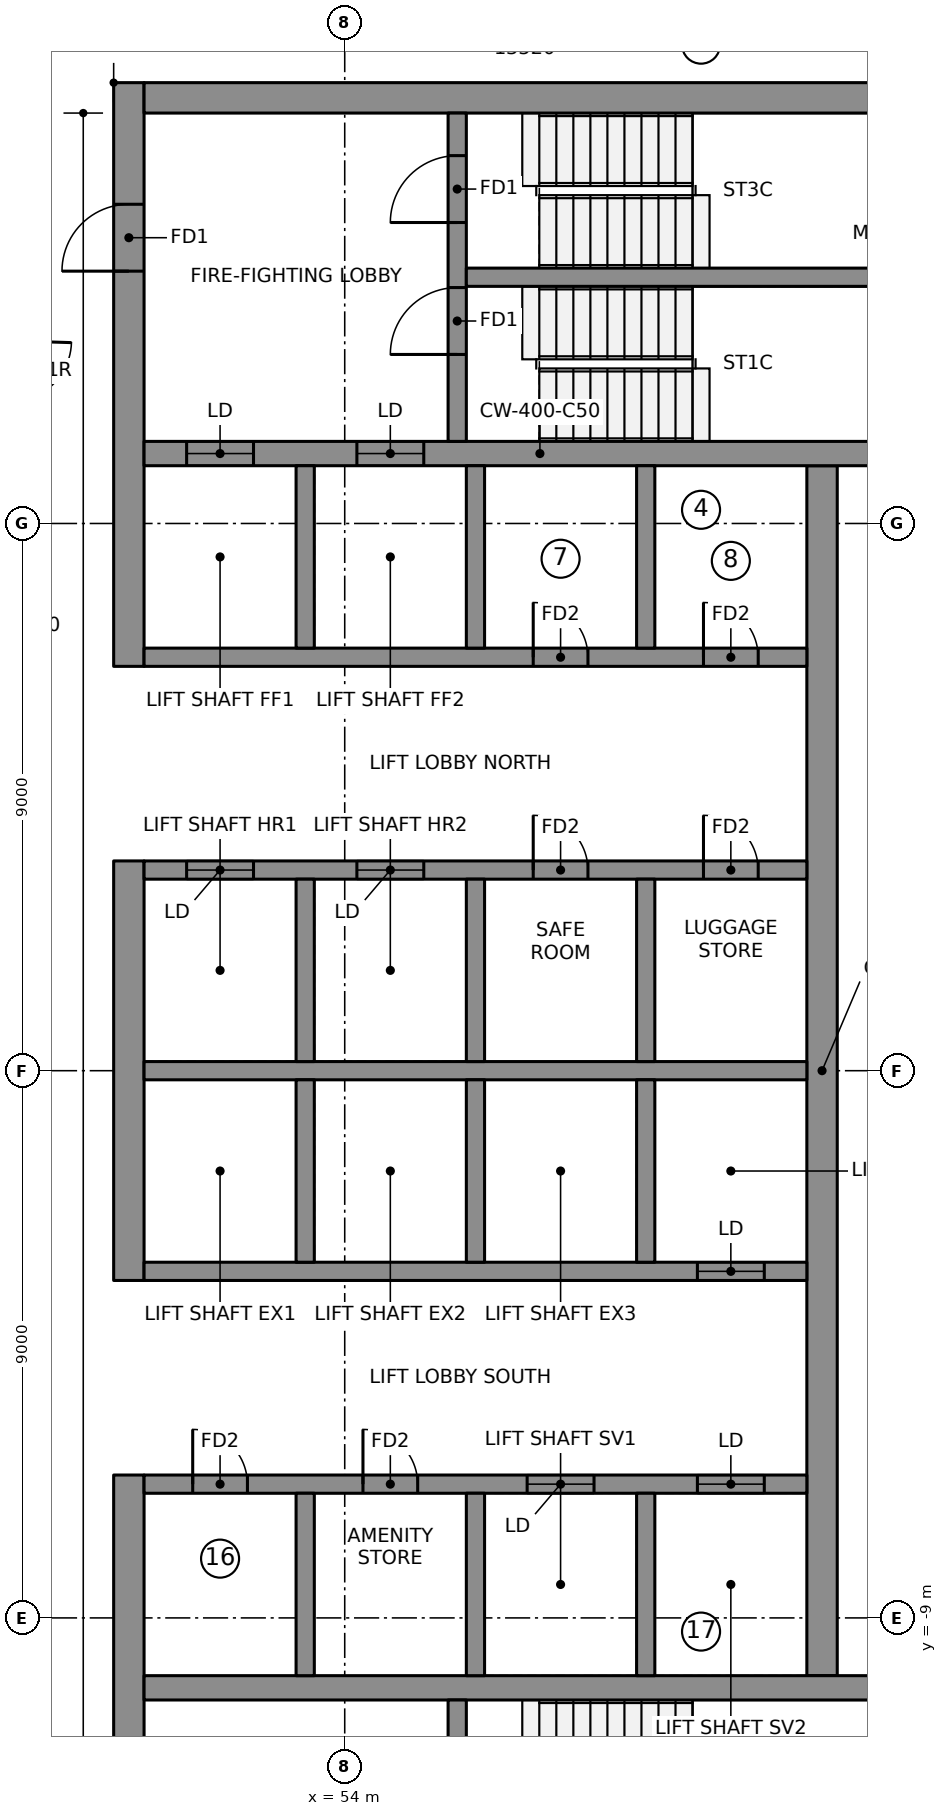
"""IFC4 building model, lengths in metres.
Left out: names, types, materials, properties, quantities, classifications, styles, units other than length and angle.
Written with IfcOpenShell. Run it as: python <this file> out.ifc"""

import sys

from ifc_helpers import new_model, si_unit, direction, frame, frame_2d, origin, place, context, subcontext, project, spatial, rectangle, extrude, element, fill, save


model = new_model("IFC4")
c1 = context("Model", 3, precision=1e-05, world=origin(), true_north=direction((0.0, 1.0)))
c2 = subcontext(c1, "Body", "Model", "MODEL_VIEW")
j1 = project(units=[si_unit("LENGTHUNIT", "METRE"), si_unit("PLANEANGLEUNIT", "RADIAN")], contexts=[c1])
p1 = place(None, origin())
s1 = spatial("IfcSite", under=j1, at=p1, CompositionType="ELEMENT")
p2 = place(p1, origin())
s2 = spatial("IfcBuilding", under=s1, at=p2, CompositionType="ELEMENT")
p3 = place(p2, frame((0.0, 0.0, 289.2)))
s3 = spatial("IfcBuildingStorey", under=s2, at=p3, CompositionType="ELEMENT", Elevation=289.2)
p4 = place(p3, frame((50.45, 6.65, 0.0), z_axis=(0.0, 0.0, 1.0), x_axis=(0.0, 1.0, 0.0)))
e1 = element("IfcWall", 1, at=p4, inside=s3, PredefinedType="SHEAR", context=c2, shape_type="SweptSolid", body=[
    extrude(rectangle(XDim=9.6, YDim=0.5, at=frame_2d((4.8, 0.0))), origin(), (0.0, 0.0, 1.0), 3.55),
])
p5 = place(p4, frame((6.5, 0.0, 0.0)))
e2 = element("IfcOpeningElement", 2, at=p5, cuts=e1, PredefinedType="OPENING", context=c2, shape_type="SweptSolid", body=[
    extrude(rectangle(XDim=1.1, YDim=2.1, at=frame_2d((0.55, 1.05))), frame((0.0, 0.26, 0.0), z_axis=(0.0, -1.0, 0.0), x_axis=(1.0, 0.0, 0.0)), (0.0, 0.0, 1.0), 0.52),
])
p6 = place(p3, frame((50.45, -3.45, 0.0), z_axis=(0.0, 0.0, 1.0), x_axis=(0.0, 1.0, 0.0)))
e3 = element("IfcWall", 3, at=p6, inside=s3, PredefinedType="SHEAR", context=c2, shape_type="SweptSolid", body=[
    extrude(rectangle(XDim=6.9, YDim=0.5, at=frame_2d((3.45, 0.0))), origin(), (0.0, 0.0, 1.0), 3.55),
])
p7 = place(p3, frame((50.45, -16.25, 0.0), z_axis=(0.0, 0.0, 1.0), x_axis=(0.0, 1.0, 0.0)))
e4 = element("IfcWall", 4, at=p7, inside=s3, PredefinedType="SHEAR", context=c2, shape_type="SweptSolid", body=[
    extrude(rectangle(XDim=9.6, YDim=0.5, at=frame_2d((4.8, 0.0))), origin(), (0.0, 0.0, 1.0), 3.55),
])
p8 = place(p7, frame((2.0, 0.0, 0.0)))
e5 = element("IfcOpeningElement", 5, at=p8, cuts=e4, PredefinedType="OPENING", context=c2, shape_type="SweptSolid", body=[
    extrude(rectangle(XDim=1.1, YDim=2.1, at=frame_2d((0.55, 1.05))), frame((0.0, 0.26, 0.0), z_axis=(0.0, -1.0, 0.0), x_axis=(1.0, 0.0, 0.0)), (0.0, 0.0, 1.0), 0.52),
])
p9 = place(p3, frame((50.7, 16.0, 0.0), z_axis=(0.0, 0.0, 1.0), x_axis=(1.0, 0.0, 0.0)))
e6 = element("IfcWall", 6, at=p9, inside=s3, PredefinedType="SHEAR", context=c2, shape_type="SweptSolid", body=[
    extrude(rectangle(XDim=13.52, YDim=0.5, at=frame_2d((6.76, 0.0))), origin(), (0.0, 0.0, 1.0), 3.55),
])
p10 = place(p3, frame((61.85, -9.95, 0.0), z_axis=(0.0, 0.0, 1.0), x_axis=(0.0, 1.0, 0.0)))
e7 = element("IfcWall", 7, at=p10, inside=s3, PredefinedType="SHEAR", context=c2, shape_type="SweptSolid", body=[
    extrude(rectangle(XDim=19.9, YDim=0.5, at=frame_2d((9.95, 0.0))), origin(), (0.0, 0.0, 1.0), 3.55),
])
p11 = place(p3, frame((50.7, 10.15, 0.0), z_axis=(0.0, 0.0, 1.0), x_axis=(1.0, 0.0, 0.0)))
e8 = element("IfcWall", 8, at=p11, inside=s3, PredefinedType="SHEAR", context=c2, shape_type="SweptSolid", body=[
    extrude(rectangle(XDim=13.02, YDim=0.4, at=frame_2d((6.51, 0.0))), origin(), (0.0, 0.0, 1.0), 3.55),
])
p12 = place(p11, frame((0.7, 0.0, 0.0)))
e9 = element("IfcOpeningElement", 9, at=p12, cuts=e8, PredefinedType="OPENING", context=c2, shape_type="SweptSolid", body=[
    extrude(rectangle(XDim=1.1, YDim=2.1, at=frame_2d((0.55, 1.05))), frame((0.0, 0.21, 0.0), z_axis=(0.0, -1.0, 0.0), x_axis=(1.0, 0.0, 0.0)), (0.0, 0.0, 1.0), 0.42),
])
p13 = place(p11, frame((3.5, 0.0, 0.0)))
e10 = element("IfcOpeningElement", 10, at=p13, cuts=e8, PredefinedType="OPENING", context=c2, shape_type="SweptSolid", body=[
    extrude(rectangle(XDim=1.1, YDim=2.1, at=frame_2d((0.55, 1.05))), frame((0.0, 0.21, 0.0), z_axis=(0.0, -1.0, 0.0), x_axis=(1.0, 0.0, 0.0)), (0.0, 0.0, 1.0), 0.42),
])
p14 = place(p3, frame((50.7, -10.15, 0.0), z_axis=(0.0, 0.0, 1.0), x_axis=(1.0, 0.0, 0.0)))
e11 = element("IfcWall", 11, at=p14, inside=s3, PredefinedType="SHEAR", context=c2, shape_type="SweptSolid", body=[
    extrude(rectangle(XDim=13.02, YDim=0.4, at=frame_2d((6.51, 0.0))), origin(), (0.0, 0.0, 1.0), 3.55),
])
p15 = place(p3, frame((50.7, 0.0, 0.0), z_axis=(0.0, 0.0, 1.0), x_axis=(1.0, 0.0, 0.0)))
e12 = element("IfcWall", 12, at=p15, inside=s3, PredefinedType="SHEAR", context=c2, shape_type="SweptSolid", body=[
    extrude(rectangle(XDim=10.9, YDim=0.3, at=frame_2d((5.45, 0.0))), origin(), (0.0, 0.0, 1.0), 3.55),
])
p16 = place(p3, frame((50.7, 3.3, 0.0), z_axis=(0.0, 0.0, 1.0), x_axis=(1.0, 0.0, 0.0)))
e13 = element("IfcWall", 13, at=p16, inside=s3, PredefinedType="SHEAR", context=c2, shape_type="SweptSolid", body=[
    extrude(rectangle(XDim=10.9, YDim=0.3, at=frame_2d((5.45, 0.0))), origin(), (0.0, 0.0, 1.0), 3.55),
])
p17 = place(p16, frame((0.7, 0.0, 0.0)))
e14 = element("IfcOpeningElement", 14, at=p17, cuts=e13, PredefinedType="OPENING", context=c2, shape_type="SweptSolid", body=[
    extrude(rectangle(XDim=1.1, YDim=2.1, at=frame_2d((0.55, 1.05))), frame((0.0, 0.16, 0.0), z_axis=(0.0, -1.0, 0.0), x_axis=(1.0, 0.0, 0.0)), (0.0, 0.0, 1.0), 0.32),
])
p18 = place(p16, frame((3.5, 0.0, 0.0)))
e15 = element("IfcOpeningElement", 15, at=p18, cuts=e13, PredefinedType="OPENING", context=c2, shape_type="SweptSolid", body=[
    extrude(rectangle(XDim=1.1, YDim=2.1, at=frame_2d((0.55, 1.05))), frame((0.0, 0.16, 0.0), z_axis=(0.0, -1.0, 0.0), x_axis=(1.0, 0.0, 0.0)), (0.0, 0.0, 1.0), 0.32),
])
p19 = place(p16, frame((6.4, 0.0, 0.0)))
e16 = element("IfcOpeningElement", 16, at=p19, cuts=e13, PredefinedType="OPENING", context=c2, shape_type="SweptSolid", body=[
    extrude(rectangle(XDim=0.9, YDim=2.1, at=frame_2d((0.45, 1.05))), frame((0.0, 0.16, 0.0), z_axis=(0.0, -1.0, 0.0), x_axis=(1.0, 0.0, 0.0)), (0.0, 0.0, 1.0), 0.32),
])
p20 = place(p16, frame((9.2, 0.0, 0.0)))
e17 = element("IfcOpeningElement", 17, at=p20, cuts=e13, PredefinedType="OPENING", context=c2, shape_type="SweptSolid", body=[
    extrude(rectangle(XDim=0.9, YDim=2.1, at=frame_2d((0.45, 1.05))), frame((0.0, 0.16, 0.0), z_axis=(0.0, -1.0, 0.0), x_axis=(1.0, 0.0, 0.0)), (0.0, 0.0, 1.0), 0.32),
])
p21 = place(p3, frame((50.7, 6.8, 0.0), z_axis=(0.0, 0.0, 1.0), x_axis=(1.0, 0.0, 0.0)))
e18 = element("IfcWall", 18, at=p21, inside=s3, PredefinedType="SHEAR", context=c2, shape_type="SweptSolid", body=[
    extrude(rectangle(XDim=10.9, YDim=0.3, at=frame_2d((5.45, 0.0))), origin(), (0.0, 0.0, 1.0), 3.55),
])
p22 = place(p21, frame((6.4, 0.0, 0.0)))
e19 = element("IfcOpeningElement", 19, at=p22, cuts=e18, PredefinedType="OPENING", context=c2, shape_type="SweptSolid", body=[
    extrude(rectangle(XDim=0.9, YDim=2.1, at=frame_2d((0.45, 1.05))), frame((0.0, 0.16, 0.0), z_axis=(0.0, -1.0, 0.0), x_axis=(1.0, 0.0, 0.0)), (0.0, 0.0, 1.0), 0.32),
])
p23 = place(p21, frame((9.2, 0.0, 0.0)))
e20 = element("IfcOpeningElement", 20, at=p23, cuts=e18, PredefinedType="OPENING", context=c2, shape_type="SweptSolid", body=[
    extrude(rectangle(XDim=0.9, YDim=2.1, at=frame_2d((0.45, 1.05))), frame((0.0, 0.16, 0.0), z_axis=(0.0, -1.0, 0.0), x_axis=(1.0, 0.0, 0.0)), (0.0, 0.0, 1.0), 0.32),
])
for number, where, z_axis, x_axis in (
    (21, (53.35, 0.15, 0.0), (0.0, 0.0, 1.0), (0.0, 1.0, 0.0)),
    (22, (53.35, 6.95, 0.0), (0.0, 0.0, 1.0), (0.0, 1.0, 0.0)),
    (23, (56.15, 0.15, 0.0), (0.0, 0.0, 1.0), (0.0, 1.0, 0.0)),
    (24, (56.15, 6.95, 0.0), (0.0, 0.0, 1.0), (0.0, 1.0, 0.0)),
    (25, (58.95, 0.15, 0.0), (0.0, 0.0, 1.0), (0.0, 1.0, 0.0)),
    (26, (58.95, 6.95, 0.0), (0.0, 0.0, 1.0), (0.0, 1.0, 0.0)),
):
    element("IfcWall", number, at=place(p3, frame(where, z_axis=z_axis, x_axis=x_axis)), inside=s3, PredefinedType="SHEAR", context=c2, shape_type="SweptSolid", body=[
        extrude(rectangle(XDim=3.0, YDim=0.3, at=frame_2d((1.5, 0.0))), origin(), (0.0, 0.0, 1.0), 3.55),
    ])
p24 = place(p3, frame((50.7, -3.3, 0.0), z_axis=(0.0, 0.0, 1.0), x_axis=(1.0, 0.0, 0.0)))
e27 = element("IfcWall", 27, at=p24, inside=s3, PredefinedType="SHEAR", context=c2, shape_type="SweptSolid", body=[
    extrude(rectangle(XDim=10.9, YDim=0.3, at=frame_2d((5.45, 0.0))), origin(), (0.0, 0.0, 1.0), 3.55),
])
p25 = place(p24, frame((9.1, 0.0, 0.0)))
e28 = element("IfcOpeningElement", 28, at=p25, cuts=e27, PredefinedType="OPENING", context=c2, shape_type="SweptSolid", body=[
    extrude(rectangle(XDim=1.1, YDim=2.1, at=frame_2d((0.55, 1.05))), frame((0.0, 0.16, 0.0), z_axis=(0.0, -1.0, 0.0), x_axis=(1.0, 0.0, 0.0)), (0.0, 0.0, 1.0), 0.32),
])
p26 = place(p3, frame((50.7, -6.8, 0.0), z_axis=(0.0, 0.0, 1.0), x_axis=(1.0, 0.0, 0.0)))
e29 = element("IfcWall", 29, at=p26, inside=s3, PredefinedType="SHEAR", context=c2, shape_type="SweptSolid", body=[
    extrude(rectangle(XDim=10.9, YDim=0.3, at=frame_2d((5.45, 0.0))), origin(), (0.0, 0.0, 1.0), 3.55),
])
p27 = place(p26, frame((6.3, 0.0, 0.0)))
e30 = element("IfcOpeningElement", 30, at=p27, cuts=e29, PredefinedType="OPENING", context=c2, shape_type="SweptSolid", body=[
    extrude(rectangle(XDim=1.1, YDim=2.1, at=frame_2d((0.55, 1.05))), frame((0.0, 0.16, 0.0), z_axis=(0.0, -1.0, 0.0), x_axis=(1.0, 0.0, 0.0)), (0.0, 0.0, 1.0), 0.32),
])
p28 = place(p26, frame((9.1, 0.0, 0.0)))
e31 = element("IfcOpeningElement", 31, at=p28, cuts=e29, PredefinedType="OPENING", context=c2, shape_type="SweptSolid", body=[
    extrude(rectangle(XDim=1.1, YDim=2.1, at=frame_2d((0.55, 1.05))), frame((0.0, 0.16, 0.0), z_axis=(0.0, -1.0, 0.0), x_axis=(1.0, 0.0, 0.0)), (0.0, 0.0, 1.0), 0.32),
])
p29 = place(p26, frame((0.8, 0.0, 0.0)))
e32 = element("IfcOpeningElement", 32, at=p29, cuts=e29, PredefinedType="OPENING", context=c2, shape_type="SweptSolid", body=[
    extrude(rectangle(XDim=0.9, YDim=2.1, at=frame_2d((0.45, 1.05))), frame((0.0, 0.16, 0.0), z_axis=(0.0, -1.0, 0.0), x_axis=(1.0, 0.0, 0.0)), (0.0, 0.0, 1.0), 0.32),
])
p30 = place(p26, frame((3.6, 0.0, 0.0)))
e33 = element("IfcOpeningElement", 33, at=p30, cuts=e29, PredefinedType="OPENING", context=c2, shape_type="SweptSolid", body=[
    extrude(rectangle(XDim=0.9, YDim=2.1, at=frame_2d((0.45, 1.05))), frame((0.0, 0.16, 0.0), z_axis=(0.0, -1.0, 0.0), x_axis=(1.0, 0.0, 0.0)), (0.0, 0.0, 1.0), 0.32),
])
for number, where, z_axis, x_axis in (
    (34, (53.35, -3.15, 0.0), (0.0, 0.0, 1.0), (0.0, 1.0, 0.0)),
    (35, (53.35, -9.95, 0.0), (0.0, 0.0, 1.0), (0.0, 1.0, 0.0)),
    (36, (56.15, -3.15, 0.0), (0.0, 0.0, 1.0), (0.0, 1.0, 0.0)),
    (37, (56.15, -9.95, 0.0), (0.0, 0.0, 1.0), (0.0, 1.0, 0.0)),
    (38, (58.95, -3.15, 0.0), (0.0, 0.0, 1.0), (0.0, 1.0, 0.0)),
    (39, (58.95, -9.95, 0.0), (0.0, 0.0, 1.0), (0.0, 1.0, 0.0)),
):
    element("IfcWall", number, at=place(p3, frame(where, z_axis=z_axis, x_axis=x_axis)), inside=s3, PredefinedType="SHEAR", context=c2, shape_type="SweptSolid", body=[
        extrude(rectangle(XDim=3.0, YDim=0.3, at=frame_2d((1.5, 0.0))), origin(), (0.0, 0.0, 1.0), 3.55),
    ])
p31 = place(p3, frame((55.85, 10.35, 0.0), z_axis=(0.0, 0.0, 1.0), x_axis=(0.0, 1.0, 0.0)))
e40 = element("IfcWall", 40, at=p31, inside=s3, PredefinedType="SHEAR", context=c2, shape_type="SweptSolid", body=[
    extrude(rectangle(XDim=5.4, YDim=0.3, at=frame_2d((2.7, 0.0))), origin(), (0.0, 0.0, 1.0), 3.55),
])
p32 = place(p31, frame((1.43, 0.0, 0.0)))
e41 = element("IfcOpeningElement", 41, at=p32, cuts=e40, PredefinedType="OPENING", context=c2, shape_type="SweptSolid", body=[
    extrude(rectangle(XDim=1.1, YDim=2.1, at=frame_2d((0.55, 1.05))), frame((0.0, 0.16, 0.0), z_axis=(0.0, -1.0, 0.0), x_axis=(1.0, 0.0, 0.0)), (0.0, 0.0, 1.0), 0.32),
])
p33 = place(p31, frame((3.6, 0.0, 0.0)))
e42 = element("IfcOpeningElement", 42, at=p33, cuts=e40, PredefinedType="OPENING", context=c2, shape_type="SweptSolid", body=[
    extrude(rectangle(XDim=1.1, YDim=2.1, at=frame_2d((0.55, 1.05))), frame((0.0, 0.16, 0.0), z_axis=(0.0, -1.0, 0.0), x_axis=(1.0, 0.0, 0.0)), (0.0, 0.0, 1.0), 0.32),
])
p34 = place(p3, frame((55.85, -15.75, 0.0), z_axis=(0.0, 0.0, 1.0), x_axis=(0.0, 1.0, 0.0)))
e43 = element("IfcWall", 43, at=p34, inside=s3, PredefinedType="SHEAR", context=c2, shape_type="SweptSolid", body=[
    extrude(rectangle(XDim=5.4, YDim=0.3, at=frame_2d((2.7, 0.0))), origin(), (0.0, 0.0, 1.0), 3.55),
])
p35 = place(p34, frame((3.6, 0.0, 0.0)))
e44 = element("IfcOpeningElement", 44, at=p35, cuts=e43, PredefinedType="OPENING", context=c2, shape_type="SweptSolid", body=[
    extrude(rectangle(XDim=1.1, YDim=2.1, at=frame_2d((0.55, 1.05))), frame((0.0, 0.16, 0.0), z_axis=(0.0, -1.0, 0.0), x_axis=(1.0, 0.0, 0.0)), (0.0, 0.0, 1.0), 0.32),
])
p36 = place(p34, frame((0.8, 0.0, 0.0)))
e45 = element("IfcOpeningElement", 45, at=p36, cuts=e43, PredefinedType="OPENING", context=c2, shape_type="SweptSolid", body=[
    extrude(rectangle(XDim=0.9, YDim=2.1, at=frame_2d((0.45, 1.05))), frame((0.0, 0.16, 0.0), z_axis=(0.0, -1.0, 0.0), x_axis=(1.0, 0.0, 0.0)), (0.0, 0.0, 1.0), 0.32),
])
p37 = place(p3, frame((56.0, 13.05, 0.0), z_axis=(0.0, 0.0, 1.0), x_axis=(1.0, 0.0, 0.0)))
e46 = element("IfcWall", 46, at=p37, inside=s3, PredefinedType="SHEAR", context=c2, shape_type="SweptSolid", body=[
    extrude(rectangle(XDim=7.72, YDim=0.3, at=frame_2d((3.86, 0.0))), origin(), (0.0, 0.0, 1.0), 3.55),
])
p38 = place(p12, origin())
e47 = element("IfcDoor", 47, at=p38, inside=s3, OperationType="DOUBLE_DOOR_SLIDING", PredefinedType="DOOR", context=c2, shape_type="SweptSolid", body=[
    extrude(rectangle(XDim=1.1, YDim=2.1, at=frame_2d((0.55, 1.05))), frame((0.0, 0.025, 0.0), z_axis=(0.0, -1.0, 0.0), x_axis=(1.0, 0.0, 0.0)), (0.0, 0.0, 1.0), 0.05),
])
fill(e9, e47)
p39 = place(p13, origin())
e48 = element("IfcDoor", 48, at=p39, inside=s3, OperationType="DOUBLE_DOOR_SLIDING", PredefinedType="DOOR", context=c2, shape_type="SweptSolid", body=[
    extrude(rectangle(XDim=1.1, YDim=2.1, at=frame_2d((0.55, 1.05))), frame((0.0, 0.025, 0.0), z_axis=(0.0, -1.0, 0.0), x_axis=(1.0, 0.0, 0.0)), (0.0, 0.0, 1.0), 0.05),
])
fill(e10, e48)
p40 = place(p17, origin())
e49 = element("IfcDoor", 49, at=p40, inside=s3, OperationType="DOUBLE_DOOR_SLIDING", PredefinedType="DOOR", context=c2, shape_type="SweptSolid", body=[
    extrude(rectangle(XDim=1.1, YDim=2.1, at=frame_2d((0.55, 1.05))), frame((0.0, 0.025, 0.0), z_axis=(0.0, -1.0, 0.0), x_axis=(1.0, 0.0, 0.0)), (0.0, 0.0, 1.0), 0.05),
])
fill(e14, e49)
p41 = place(p18, origin())
e50 = element("IfcDoor", 50, at=p41, inside=s3, OperationType="DOUBLE_DOOR_SLIDING", PredefinedType="DOOR", context=c2, shape_type="SweptSolid", body=[
    extrude(rectangle(XDim=1.1, YDim=2.1, at=frame_2d((0.55, 1.05))), frame((0.0, 0.025, 0.0), z_axis=(0.0, -1.0, 0.0), x_axis=(1.0, 0.0, 0.0)), (0.0, 0.0, 1.0), 0.05),
])
fill(e15, e50)
p42 = place(p25, origin())
e51 = element("IfcDoor", 51, at=p42, inside=s3, OperationType="DOUBLE_DOOR_SLIDING", PredefinedType="DOOR", context=c2, shape_type="SweptSolid", body=[
    extrude(rectangle(XDim=1.1, YDim=2.1, at=frame_2d((0.55, 1.05))), frame((0.0, 0.025, 0.0), z_axis=(0.0, -1.0, 0.0), x_axis=(1.0, 0.0, 0.0)), (0.0, 0.0, 1.0), 0.05),
])
fill(e28, e51)
p43 = place(p27, origin())
e52 = element("IfcDoor", 52, at=p43, inside=s3, OperationType="DOUBLE_DOOR_SLIDING", PredefinedType="DOOR", context=c2, shape_type="SweptSolid", body=[
    extrude(rectangle(XDim=1.1, YDim=2.1, at=frame_2d((0.55, 1.05))), frame((0.0, 0.025, 0.0), z_axis=(0.0, -1.0, 0.0), x_axis=(1.0, 0.0, 0.0)), (0.0, 0.0, 1.0), 0.05),
])
fill(e30, e52)
p44 = place(p28, origin())
e53 = element("IfcDoor", 53, at=p44, inside=s3, OperationType="DOUBLE_DOOR_SLIDING", PredefinedType="DOOR", context=c2, shape_type="SweptSolid", body=[
    extrude(rectangle(XDim=1.1, YDim=2.1, at=frame_2d((0.55, 1.05))), frame((0.0, 0.025, 0.0), z_axis=(0.0, -1.0, 0.0), x_axis=(1.0, 0.0, 0.0)), (0.0, 0.0, 1.0), 0.05),
])
fill(e31, e53)
p45 = place(p32, origin())
e54 = element("IfcDoor", 54, at=p45, inside=s3, OperationType="SINGLE_SWING_RIGHT", PredefinedType="DOOR", context=c2, shape_type="SweptSolid", body=[
    extrude(rectangle(XDim=1.1, YDim=2.1, at=frame_2d((0.55, 1.05))), frame((0.0, 0.025, 0.0), z_axis=(0.0, -1.0, 0.0), x_axis=(1.0, 0.0, 0.0)), (0.0, 0.0, 1.0), 0.05),
])
fill(e41, e54)
p46 = place(p33, origin())
e55 = element("IfcDoor", 55, at=p46, inside=s3, OperationType="SINGLE_SWING_RIGHT", PredefinedType="DOOR", context=c2, shape_type="SweptSolid", body=[
    extrude(rectangle(XDim=1.1, YDim=2.1, at=frame_2d((0.55, 1.05))), frame((0.0, 0.025, 0.0), z_axis=(0.0, -1.0, 0.0), x_axis=(1.0, 0.0, 0.0)), (0.0, 0.0, 1.0), 0.05),
])
fill(e42, e55)
p47 = place(p5, origin())
e56 = element("IfcDoor", 56, at=p47, inside=s3, OperationType="SINGLE_SWING_RIGHT", PredefinedType="DOOR", context=c2, shape_type="SweptSolid", body=[
    extrude(rectangle(XDim=1.1, YDim=2.1, at=frame_2d((0.55, 1.05))), frame((0.0, 0.025, 0.0), z_axis=(0.0, -1.0, 0.0), x_axis=(1.0, 0.0, 0.0)), (0.0, 0.0, 1.0), 0.05),
])
fill(e2, e56)
p48 = place(p22, origin())
e57 = element("IfcDoor", 57, at=p48, inside=s3, OperationType="SINGLE_SWING_LEFT", PredefinedType="DOOR", context=c2, shape_type="SweptSolid", body=[
    extrude(rectangle(XDim=0.9, YDim=2.1, at=frame_2d((0.45, 1.05))), frame((0.0, 0.025, 0.0), z_axis=(0.0, -1.0, 0.0), x_axis=(1.0, 0.0, 0.0)), (0.0, 0.0, 1.0), 0.05),
])
fill(e19, e57)
p49 = place(p23, origin())
e58 = element("IfcDoor", 58, at=p49, inside=s3, OperationType="SINGLE_SWING_LEFT", PredefinedType="DOOR", context=c2, shape_type="SweptSolid", body=[
    extrude(rectangle(XDim=0.9, YDim=2.1, at=frame_2d((0.45, 1.05))), frame((0.0, 0.025, 0.0), z_axis=(0.0, -1.0, 0.0), x_axis=(1.0, 0.0, 0.0)), (0.0, 0.0, 1.0), 0.05),
])
fill(e20, e58)
p50 = place(p19, origin())
e59 = element("IfcDoor", 59, at=p50, inside=s3, OperationType="SINGLE_SWING_LEFT", PredefinedType="DOOR", context=c2, shape_type="SweptSolid", body=[
    extrude(rectangle(XDim=0.9, YDim=2.1, at=frame_2d((0.45, 1.05))), frame((0.0, 0.025, 0.0), z_axis=(0.0, -1.0, 0.0), x_axis=(1.0, 0.0, 0.0)), (0.0, 0.0, 1.0), 0.05),
])
fill(e16, e59)
p51 = place(p20, origin())
e60 = element("IfcDoor", 60, at=p51, inside=s3, OperationType="SINGLE_SWING_LEFT", PredefinedType="DOOR", context=c2, shape_type="SweptSolid", body=[
    extrude(rectangle(XDim=0.9, YDim=2.1, at=frame_2d((0.45, 1.05))), frame((0.0, 0.025, 0.0), z_axis=(0.0, -1.0, 0.0), x_axis=(1.0, 0.0, 0.0)), (0.0, 0.0, 1.0), 0.05),
])
fill(e17, e60)
p52 = place(p29, origin())
e61 = element("IfcDoor", 61, at=p52, inside=s3, OperationType="SINGLE_SWING_LEFT", PredefinedType="DOOR", context=c2, shape_type="SweptSolid", body=[
    extrude(rectangle(XDim=0.9, YDim=2.1, at=frame_2d((0.45, 1.05))), frame((0.0, 0.025, 0.0), z_axis=(0.0, -1.0, 0.0), x_axis=(1.0, 0.0, 0.0)), (0.0, 0.0, 1.0), 0.05),
])
fill(e32, e61)
p53 = place(p30, origin())
e62 = element("IfcDoor", 62, at=p53, inside=s3, OperationType="SINGLE_SWING_LEFT", PredefinedType="DOOR", context=c2, shape_type="SweptSolid", body=[
    extrude(rectangle(XDim=0.9, YDim=2.1, at=frame_2d((0.45, 1.05))), frame((0.0, 0.025, 0.0), z_axis=(0.0, -1.0, 0.0), x_axis=(1.0, 0.0, 0.0)), (0.0, 0.0, 1.0), 0.05),
])
fill(e33, e62)
save(model, sys.argv[1])
